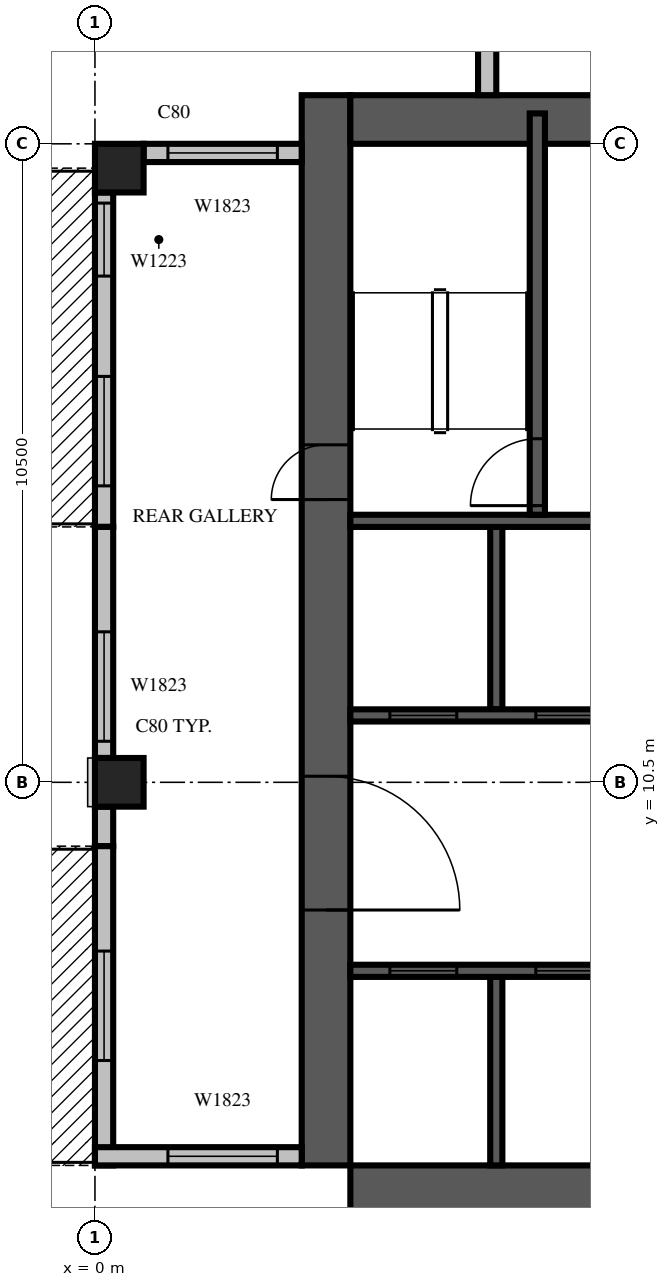
"""IFC4 building model, lengths in metres.
Left out: names, types, materials, properties, quantities, classifications, styles, units other than length and angle.
Written with IfcOpenShell. Run it as: python <this file> out.ifc"""

import sys

from ifc_helpers import new_model, si_unit, direction, frame, frame_2d, origin, origin_2d, place, context, subcontext, project, spatial, rectangle, extrude, source, transform, mapped, element, fill, save


model = new_model("IFC4")
c1 = context("Model", 3, precision=1e-05, world=origin(), true_north=direction((0.0, 1.0)))
c2 = subcontext(c1, "Body", "Model", "MODEL_VIEW")
j1 = project(units=[si_unit("LENGTHUNIT", "METRE"), si_unit("PLANEANGLEUNIT", "RADIAN")], contexts=[c1])
p1 = place(None, origin())
s1 = spatial("IfcSite", under=j1, at=p1, CompositionType="ELEMENT")
p2 = place(p1, origin())
s2 = spatial("IfcBuilding", under=s1, at=p2, CompositionType="ELEMENT")
p3 = place(p2, frame((0.0, 0.0, 253.8)))
s3 = spatial("IfcBuildingStorey", under=s2, at=p3, CompositionType="ELEMENT", Elevation=253.8)
m1 = source(origin(), c2, "Body", "SweptSolid", [
    extrude(rectangle(XDim=0.8, YDim=0.8, at=origin_2d()), origin(), (0.0, 0.0, 1.0), 3.8),
])
for number, where, z_axis, x_axis in (
    (1, (0.4, 10.5, 0.0), (0.0, 0.0, 1.0), (1.0, 0.0, 0.0)),
    (2, (0.4, 20.6, 0.0), (0.0, 0.0, 1.0), (1.0, 0.0, 0.0)),
):
    element("IfcColumn", number, at=place(p3, frame(where, z_axis=z_axis, x_axis=x_axis)), inside=s3, PredefinedType="COLUMN", context=c2, shape_type="MappedRepresentation", body=[
        mapped(m1, transform((0.0, 0.0, 0.0), scale=1.0)),
    ])
m2 = source(origin(), c2, "Body", "SweptSolid", [
    extrude(rectangle(XDim=17.6, YDim=0.8, at=frame_2d((8.8, 0.0))), origin(), (0.0, 0.0, 1.0), 3.8),
])
p4 = place(p3, frame((3.8, 4.2, 0.0), z_axis=(0.0, 0.0, 1.0), x_axis=(0.0, 1.0, 0.0)))
e3 = element("IfcWall", 3, at=p4, inside=s3, PredefinedType="SHEAR", context=c2, shape_type="MappedRepresentation", body=[
    mapped(m2, transform((0.0, 0.0, 0.0), scale=1.0)),
])
m3 = source(origin(), c2, "Body", "SweptSolid", [
    extrude(rectangle(XDim=2.2, YDim=2.1, at=frame_2d((1.1, 1.05))), frame((0.0, 0.41, 0.0), z_axis=(0.0, -1.0, 0.0), x_axis=(1.0, 0.0, 0.0)), (0.0, 0.0, 1.0), 0.82),
])
p5 = place(p4, frame((4.2, 0.0, 0.0)))
e4 = element("IfcOpeningElement", 4, at=p5, cuts=e3, PredefinedType="OPENING", context=c2, shape_type="MappedRepresentation", body=[
    mapped(m3, transform((0.0, 0.0, 0.0), scale=1.0)),
])
m4 = source(origin(), c2, "Body", "SweptSolid", [
    extrude(rectangle(XDim=0.9, YDim=2.1, at=frame_2d((0.45, 1.05))), frame((0.0, 0.41, 0.0), z_axis=(0.0, -1.0, 0.0), x_axis=(1.0, 0.0, 0.0)), (0.0, 0.0, 1.0), 0.82),
])
p6 = place(p4, frame((10.95, 0.0, 0.0)))
e5 = element("IfcOpeningElement", 5, at=p6, cuts=e3, PredefinedType="OPENING", context=c2, shape_type="MappedRepresentation", body=[
    mapped(m4, transform((0.0, 0.0, 0.0), scale=1.0)),
])
p7 = place(p3, frame((4.2, 3.8, 0.0), z_axis=(0.0, 0.0, 1.0), x_axis=(1.0, 0.0, 0.0)))
e6 = element("IfcWall", 6, at=p7, inside=s3, PredefinedType="SHEAR", context=c2, shape_type="MappedRepresentation", body=[
    mapped(m2, transform((0.0, 0.0, 0.0), scale=1.0)),
])
p8 = place(p7, frame((11.55, 0.0, 0.0)))
e7 = element("IfcOpeningElement", 7, at=p8, cuts=e6, PredefinedType="OPENING", context=c2, shape_type="MappedRepresentation", body=[
    mapped(m4, transform((0.0, 0.0, 0.0), scale=1.0)),
])
m5 = source(origin(), c2, "Body", "SweptSolid", [
    extrude(rectangle(XDim=16.8, YDim=0.8, at=frame_2d((8.4, 0.0))), origin(), (0.0, 0.0, 1.0), 3.8),
])
p9 = place(p3, frame((4.2, 21.4, 0.0), z_axis=(0.0, 0.0, 1.0), x_axis=(1.0, 0.0, 0.0)))
e8 = element("IfcWall", 8, at=p9, inside=s3, PredefinedType="SHEAR", context=c2, shape_type="MappedRepresentation", body=[
    mapped(m5, transform((0.0, 0.0, 0.0), scale=1.0)),
])
m6 = source(origin(), c2, "Body", "SweptSolid", [
    extrude(rectangle(XDim=1.2, YDim=2.1, at=frame_2d((0.6, 1.05))), frame((0.0, 0.41, 0.0), z_axis=(0.0, -1.0, 0.0), x_axis=(1.0, 0.0, 0.0)), (0.0, 0.0, 1.0), 0.82),
])
p10 = place(p9, frame((6.2, 0.0, 0.0)))
e9 = element("IfcOpeningElement", 9, at=p10, cuts=e8, PredefinedType="OPENING", context=c2, shape_type="MappedRepresentation", body=[
    mapped(m6, transform((0.0, 0.0, 0.0), scale=1.0)),
])
m7 = source(origin(), c2, "Body", "SweptSolid", [
    extrude(rectangle(XDim=16.6, YDim=0.3, at=frame_2d((8.3, 0.0))), origin(), (0.0, 0.0, 1.0), 3.4),
])
p11 = place(p3, frame((6.45, 38.4, 0.0), z_axis=(0.0, 0.0, 1.0), x_axis=(0.0, -1.0, 0.0)))
e10 = element("IfcWall", 10, at=p11, inside=s3, PredefinedType="STANDARD", context=c2, shape_type="MappedRepresentation", body=[
    mapped(m7, transform((0.0, 0.0, 0.0), scale=1.0)),
])
m8 = source(origin(), c2, "Body", "SweptSolid", [
    extrude(rectangle(XDim=1.8, YDim=2.3, at=frame_2d((0.9, 1.15))), frame((0.0, 0.16, 0.0), z_axis=(0.0, -1.0, 0.0), x_axis=(1.0, 0.0, 0.0)), (0.0, 0.0, 1.0), 0.32),
])
p12 = place(p11, frame((1.15, 0.0, 0.6)))
e11 = element("IfcOpeningElement", 11, at=p12, cuts=e10, PredefinedType="OPENING", context=c2, shape_type="MappedRepresentation", body=[
    mapped(m8, transform((0.0, 0.0, 0.0), scale=1.0)),
])
p13 = place(p11, frame((9.438, 0.0, 0.6)))
e12 = element("IfcOpeningElement", 12, at=p13, cuts=e10, PredefinedType="OPENING", context=c2, shape_type="MappedRepresentation", body=[
    mapped(m8, transform((0.0, 0.0, 0.0), scale=1.0)),
])
m9 = source(origin(), c2, "Body", "SweptSolid", [
    extrude(rectangle(XDim=3.0, YDim=2.3, at=frame_2d((1.5, 1.15))), frame((0.0, 0.16, 0.0), z_axis=(0.0, -1.0, 0.0), x_axis=(1.0, 0.0, 0.0)), (0.0, 0.0, 1.0), 0.32),
])
p14 = place(p11, frame((12.7, 0.0, 0.6)))
e13 = element("IfcOpeningElement", 13, at=p14, cuts=e10, PredefinedType="OPENING", context=c2, shape_type="MappedRepresentation", body=[
    mapped(m9, transform((0.0, 0.0, 0.0), scale=1.0)),
])
m10 = source(origin(), c2, "Body", "SweptSolid", [
    extrude(rectangle(XDim=1.0, YDim=2.1, at=frame_2d((0.5, 1.05))), frame((0.0, 0.16, 0.0), z_axis=(0.0, -1.0, 0.0), x_axis=(1.0, 0.0, 0.0)), (0.0, 0.0, 1.0), 0.32),
])
p15 = place(p11, frame((5.45, 0.0, 0.0)))
e14 = element("IfcOpeningElement", 14, at=p15, cuts=e10, PredefinedType="OPENING", context=c2, shape_type="MappedRepresentation", body=[
    mapped(m10, transform((0.0, 0.0, 0.0), scale=1.0)),
])
m11 = source(origin(), c2, "Body", "SweptSolid", [
    extrude(rectangle(XDim=2.6, YDim=0.3, at=frame_2d((1.3, 0.0))), origin(), (0.0, 0.0, 1.0), 3.4),
])
p16 = place(p3, frame((3.4, 20.85, 0.0), z_axis=(0.0, 0.0, 1.0), x_axis=(-1.0, 0.0, 0.0)))
e15 = element("IfcWall", 15, at=p16, inside=s3, PredefinedType="STANDARD", context=c2, shape_type="MappedRepresentation", body=[
    mapped(m11, transform((0.0, 0.0, 0.0), scale=1.0)),
])
p17 = place(p16, frame((0.4, 0.0, 0.6)))
e16 = element("IfcOpeningElement", 16, at=p17, cuts=e15, PredefinedType="OPENING", context=c2, shape_type="MappedRepresentation", body=[
    mapped(m8, transform((0.0, 0.0, 0.0), scale=1.0)),
])
p18 = place(p3, frame((0.15, 20.2, 0.0), z_axis=(0.0, 0.0, 1.0), x_axis=(0.0, -1.0, 0.0)))
e17 = element("IfcWall", 17, at=p18, inside=s3, PredefinedType="STANDARD", context=c2, shape_type="SweptSolid", body=[
    extrude(rectangle(XDim=5.5, YDim=0.3, at=frame_2d((2.75, 0.0))), origin(), (0.0, 0.0, 1.0), 3.4),
])
m12 = source(origin(), c2, "Body", "SweptSolid", [
    extrude(rectangle(XDim=1.8, YDim=2.4, at=frame_2d((0.9, 1.2))), frame((0.0, 0.16, 0.0), z_axis=(0.0, -1.0, 0.0), x_axis=(1.0, 0.0, 0.0)), (0.0, 0.0, 1.0), 0.32),
])
p19 = place(p18, frame((3.025, 0.0, 0.0)))
e18 = element("IfcOpeningElement", 18, at=p19, cuts=e17, PredefinedType="OPENING", context=c2, shape_type="MappedRepresentation", body=[
    mapped(m12, transform((0.0, 0.0, 0.0), scale=1.0)),
])
m13 = source(origin(), c2, "Body", "SweptSolid", [
    extrude(rectangle(XDim=1.2, YDim=2.3, at=frame_2d((0.6, 1.15))), frame((0.0, 0.16, 0.0), z_axis=(0.0, -1.0, 0.0), x_axis=(1.0, 0.0, 0.0)), (0.0, 0.0, 1.0), 0.32),
])
p20 = place(p18, frame((0.175, 0.0, 0.6)))
e19 = element("IfcOpeningElement", 19, at=p20, cuts=e17, PredefinedType="OPENING", context=c2, shape_type="MappedRepresentation", body=[
    mapped(m13, transform((0.0, 0.0, 0.0), scale=1.0)),
])
m14 = source(origin(), c2, "Body", "SweptSolid", [
    extrude(rectangle(XDim=3.8, YDim=0.3, at=frame_2d((1.9, 0.0))), origin(), (0.0, 0.0, 1.0), 3.4),
])
p21 = place(p3, frame((0.15, 14.7, 0.0), z_axis=(0.0, 0.0, 1.0), x_axis=(0.0, -1.0, 0.0)))
e20 = element("IfcWall", 20, at=p21, inside=s3, PredefinedType="STANDARD", context=c2, shape_type="MappedRepresentation", body=[
    mapped(m14, transform((0.0, 0.0, 0.0), scale=1.0)),
])
p22 = place(p21, frame((1.725, 0.0, 0.6)))
e21 = element("IfcOpeningElement", 21, at=p22, cuts=e20, PredefinedType="OPENING", context=c2, shape_type="MappedRepresentation", body=[
    mapped(m8, transform((0.0, 0.0, 0.0), scale=1.0)),
])
m15 = source(origin(), c2, "Body", "SweptSolid", [
    extrude(rectangle(XDim=0.65, YDim=0.3, at=frame_2d((0.325, 0.0))), origin(), (0.0, 0.0, 1.0), 3.4),
])
p23 = place(p3, frame((0.15, 10.1, 0.0), z_axis=(0.0, 0.0, 1.0), x_axis=(0.0, -1.0, 0.0)))
e22 = element("IfcWall", 22, at=p23, inside=s3, PredefinedType="STANDARD", context=c2, shape_type="MappedRepresentation", body=[
    mapped(m15, transform((0.0, 0.0, 0.0), scale=1.0)),
])
m16 = source(origin(), c2, "Body", "SweptSolid", [
    extrude(rectangle(XDim=5.25, YDim=0.3, at=frame_2d((2.625, 0.0))), origin(), (0.0, 0.0, 1.0), 3.4),
])
p24 = place(p3, frame((0.15, 9.45, 0.0), z_axis=(0.0, 0.0, 1.0), x_axis=(0.0, -1.0, 0.0)))
e23 = element("IfcWall", 23, at=p24, inside=s3, PredefinedType="STANDARD", context=c2, shape_type="MappedRepresentation", body=[
    mapped(m16, transform((0.0, 0.0, 0.0), scale=1.0)),
])
p25 = place(p24, frame((1.725, 0.0, 0.0)))
e24 = element("IfcOpeningElement", 24, at=p25, cuts=e23, PredefinedType="OPENING", context=c2, shape_type="MappedRepresentation", body=[
    mapped(m12, transform((0.0, 0.0, 0.0), scale=1.0)),
])
m17 = source(origin(), c2, "Body", "SweptSolid", [
    extrude(rectangle(XDim=3.4, YDim=0.3, at=frame_2d((1.7, 0.0))), origin(), (0.0, 0.0, 1.0), 3.4),
])
p26 = place(p3, frame((0.0, 4.35, 0.0), z_axis=(0.0, 0.0, 1.0), x_axis=(1.0, 0.0, 0.0)))
e25 = element("IfcWall", 25, at=p26, inside=s3, PredefinedType="STANDARD", context=c2, shape_type="MappedRepresentation", body=[
    mapped(m17, transform((0.0, 0.0, 0.0), scale=1.0)),
])
p27 = place(p26, frame((1.2, 0.0, 0.6)))
e26 = element("IfcOpeningElement", 26, at=p27, cuts=e25, PredefinedType="OPENING", context=c2, shape_type="MappedRepresentation", body=[
    mapped(m8, transform((0.0, 0.0, 0.0), scale=1.0)),
])
m18 = source(origin(), c2, "Body", "SweptSolid", [
    extrude(rectangle(XDim=3.1, YDim=0.2, at=frame_2d((1.55, 0.0))), origin(), (0.0, 0.0, 1.0), 3.8),
])
p28 = place(p3, frame((6.6, 4.2, 0.0), z_axis=(0.0, 0.0, 1.0), x_axis=(0.0, 1.0, 0.0)))
e27 = element("IfcWall", 27, at=p28, inside=s3, PredefinedType="SOLIDWALL", context=c2, shape_type="MappedRepresentation", body=[
    mapped(m18, transform((0.0, 0.0, 0.0), scale=1.0)),
])
m19 = source(origin(), c2, "Body", "SweptSolid", [
    extrude(rectangle(XDim=3.0, YDim=0.2, at=frame_2d((1.5, 0.0))), origin(), (0.0, 0.0, 1.0), 3.8),
])
p29 = place(p3, frame((6.6, 11.7, 0.0), z_axis=(0.0, 0.0, 1.0), x_axis=(0.0, 1.0, 0.0)))
e28 = element("IfcWall", 28, at=p29, inside=s3, PredefinedType="SOLIDWALL", context=c2, shape_type="MappedRepresentation", body=[
    mapped(m19, transform((0.0, 0.0, 0.0), scale=1.0)),
])
m20 = source(origin(), c2, "Body", "SweptSolid", [
    extrude(rectangle(XDim=9.6, YDim=0.2, at=frame_2d((4.8, 0.0))), origin(), (0.0, 0.0, 1.0), 3.8),
])
p30 = place(p3, frame((4.2, 7.4, 0.0), z_axis=(0.0, 0.0, 1.0), x_axis=(1.0, 0.0, 0.0)))
e29 = element("IfcWall", 29, at=p30, inside=s3, PredefinedType="SOLIDWALL", context=c2, shape_type="MappedRepresentation", body=[
    mapped(m20, transform((0.0, 0.0, 0.0), scale=1.0)),
])
m21 = source(origin(), c2, "Body", "SweptSolid", [
    extrude(rectangle(XDim=1.1, YDim=2.1, at=frame_2d((0.55, 1.05))), frame((0.0, 0.11, 0.0), z_axis=(0.0, -1.0, 0.0), x_axis=(1.0, 0.0, 0.0)), (0.0, 0.0, 1.0), 0.22),
])
p31 = place(p30, frame((0.65, 0.0, 0.0)))
e30 = element("IfcOpeningElement", 30, at=p31, cuts=e29, PredefinedType="OPENING", context=c2, shape_type="MappedRepresentation", body=[
    mapped(m21, transform((0.0, 0.0, 0.0), scale=1.0)),
])
p32 = place(p30, frame((3.05, 0.0, 0.0)))
e31 = element("IfcOpeningElement", 31, at=p32, cuts=e29, PredefinedType="OPENING", context=c2, shape_type="MappedRepresentation", body=[
    mapped(m21, transform((0.0, 0.0, 0.0), scale=1.0)),
])
p33 = place(p30, frame((5.45, 0.0, 0.0)))
e32 = element("IfcOpeningElement", 32, at=p33, cuts=e29, PredefinedType="OPENING", context=c2, shape_type="MappedRepresentation", body=[
    mapped(m21, transform((0.0, 0.0, 0.0), scale=1.0)),
])
p34 = place(p30, frame((7.85, 0.0, 0.0)))
e33 = element("IfcOpeningElement", 33, at=p34, cuts=e29, PredefinedType="OPENING", context=c2, shape_type="MappedRepresentation", body=[
    mapped(m21, transform((0.0, 0.0, 0.0), scale=1.0)),
])
m22 = source(origin(), c2, "Body", "SweptSolid", [
    extrude(rectangle(XDim=4.8, YDim=0.2, at=frame_2d((2.4, 0.0))), origin(), (0.0, 0.0, 1.0), 3.8),
])
p35 = place(p3, frame((4.2, 11.6, 0.0), z_axis=(0.0, 0.0, 1.0), x_axis=(1.0, 0.0, 0.0)))
e34 = element("IfcWall", 34, at=p35, inside=s3, PredefinedType="SOLIDWALL", context=c2, shape_type="MappedRepresentation", body=[
    mapped(m22, transform((0.0, 0.0, 0.0), scale=1.0)),
])
p36 = place(p35, frame((0.65, 0.0, 0.0)))
e35 = element("IfcOpeningElement", 35, at=p36, cuts=e34, PredefinedType="OPENING", context=c2, shape_type="MappedRepresentation", body=[
    mapped(m21, transform((0.0, 0.0, 0.0), scale=1.0)),
])
p37 = place(p35, frame((3.05, 0.0, 0.0)))
e36 = element("IfcOpeningElement", 36, at=p37, cuts=e34, PredefinedType="OPENING", context=c2, shape_type="MappedRepresentation", body=[
    mapped(m21, transform((0.0, 0.0, 0.0), scale=1.0)),
])
p38 = place(p3, frame((4.2, 14.8, 0.0), z_axis=(0.0, 0.0, 1.0), x_axis=(1.0, 0.0, 0.0)))
e37 = element("IfcWall", 37, at=p38, inside=s3, PredefinedType="SOLIDWALL", context=c2, shape_type="MappedRepresentation", body=[
    mapped(m22, transform((0.0, 0.0, 0.0), scale=1.0)),
])
m23 = source(origin(), c2, "Body", "SweptSolid", [
    extrude(rectangle(XDim=6.6, YDim=0.25, at=frame_2d((3.3, 0.0))), origin(), (0.0, 0.0, 1.0), 3.4),
])
p39 = place(p3, frame((7.275, 14.9, 0.0), z_axis=(0.0, 0.0, 1.0), x_axis=(0.0, 1.0, 0.0)))
e38 = element("IfcWall", 38, at=p39, inside=s3, PredefinedType="SOLIDWALL", context=c2, shape_type="MappedRepresentation", body=[
    mapped(m23, transform((0.0, 0.0, 0.0), scale=1.0)),
])
m24 = source(origin(), c2, "Body", "SweptSolid", [
    extrude(rectangle(XDim=1.1, YDim=2.1, at=frame_2d((0.55, 1.05))), frame((0.0, 0.135, 0.0), z_axis=(0.0, -1.0, 0.0), x_axis=(1.0, 0.0, 0.0)), (0.0, 0.0, 1.0), 0.27),
])
p40 = place(p39, frame((0.15, 0.0, 0.0)))
e39 = element("IfcOpeningElement", 39, at=p40, cuts=e38, PredefinedType="OPENING", context=c2, shape_type="MappedRepresentation", body=[
    mapped(m24, transform((0.0, 0.0, 0.0), scale=1.0)),
])
m25 = source(origin(), c2, "Body", "SweptSolid", [
    extrude(rectangle(XDim=1.8, YDim=2.3, at=frame_2d((0.9, 1.15))), frame((0.0, 0.03, 0.0), z_axis=(0.0, -1.0, 0.0), x_axis=(1.0, 0.0, 0.0)), (0.0, 0.0, 1.0), 0.06),
])
p41 = place(p17, origin())
e40 = element("IfcWindow", 40, at=p41, inside=s3, PartitioningType="SINGLE_PANEL", PredefinedType="WINDOW", context=c2, shape_type="MappedRepresentation", body=[
    mapped(m25, transform((0.0, 0.0, 0.0), scale=1.0)),
])
fill(e16, e40)
m26 = source(origin(), c2, "Body", "SweptSolid", [
    extrude(rectangle(XDim=1.8, YDim=2.4, at=frame_2d((0.9, 1.2))), frame((0.0, 0.025, 0.0), z_axis=(0.0, -1.0, 0.0), x_axis=(1.0, 0.0, 0.0)), (0.0, 0.0, 1.0), 0.05),
])
p42 = place(p19, origin())
e41 = element("IfcDoor", 41, at=p42, inside=s3, OperationType="SLIDING_TO_LEFT", PredefinedType="DOOR", context=c2, shape_type="MappedRepresentation", body=[
    mapped(m26, transform((0.0, 0.0, 0.0), scale=1.0)),
])
fill(e18, e41)
m27 = source(origin(), c2, "Body", "SweptSolid", [
    extrude(rectangle(XDim=1.2, YDim=2.3, at=frame_2d((0.6, 1.15))), frame((0.0, 0.03, 0.0), z_axis=(0.0, -1.0, 0.0), x_axis=(1.0, 0.0, 0.0)), (0.0, 0.0, 1.0), 0.06),
])
p43 = place(p20, origin())
e42 = element("IfcWindow", 42, at=p43, inside=s3, PartitioningType="SINGLE_PANEL", PredefinedType="WINDOW", context=c2, shape_type="MappedRepresentation", body=[
    mapped(m27, transform((0.0, 0.0, 0.0), scale=1.0)),
])
fill(e19, e42)
p44 = place(p22, origin())
e43 = element("IfcWindow", 43, at=p44, inside=s3, PartitioningType="SINGLE_PANEL", PredefinedType="WINDOW", context=c2, shape_type="MappedRepresentation", body=[
    mapped(m25, transform((0.0, 0.0, 0.0), scale=1.0)),
])
fill(e21, e43)
p45 = place(p25, origin())
e44 = element("IfcDoor", 44, at=p45, inside=s3, OperationType="SLIDING_TO_LEFT", PredefinedType="DOOR", context=c2, shape_type="MappedRepresentation", body=[
    mapped(m26, transform((0.0, 0.0, 0.0), scale=1.0)),
])
fill(e24, e44)
p46 = place(p27, origin())
e45 = element("IfcWindow", 45, at=p46, inside=s3, PartitioningType="SINGLE_PANEL", PredefinedType="WINDOW", context=c2, shape_type="MappedRepresentation", body=[
    mapped(m25, transform((0.0, 0.0, 0.0), scale=1.0)),
])
fill(e26, e45)
m28 = source(origin(), c2, "Body", "SweptSolid", [
    extrude(rectangle(XDim=1.1, YDim=2.1, at=frame_2d((0.55, 1.05))), frame((0.0, 0.025, 0.0), z_axis=(0.0, -1.0, 0.0), x_axis=(1.0, 0.0, 0.0)), (0.0, 0.0, 1.0), 0.05),
])
p47 = place(p31, origin())
e46 = element("IfcDoor", 46, at=p47, inside=s3, OperationType="SLIDING_TO_LEFT", PredefinedType="DOOR", context=c2, shape_type="MappedRepresentation", body=[
    mapped(m28, transform((0.0, 0.0, 0.0), scale=1.0)),
])
fill(e30, e46)
p48 = place(p32, origin())
e47 = element("IfcDoor", 47, at=p48, inside=s3, OperationType="SLIDING_TO_LEFT", PredefinedType="DOOR", context=c2, shape_type="MappedRepresentation", body=[
    mapped(m28, transform((0.0, 0.0, 0.0), scale=1.0)),
])
fill(e31, e47)
p49 = place(p36, origin())
e48 = element("IfcDoor", 48, at=p49, inside=s3, OperationType="SLIDING_TO_LEFT", PredefinedType="DOOR", context=c2, shape_type="MappedRepresentation", body=[
    mapped(m28, transform((0.0, 0.0, 0.0), scale=1.0)),
])
fill(e35, e48)
p50 = place(p37, origin())
e49 = element("IfcDoor", 49, at=p50, inside=s3, OperationType="SLIDING_TO_LEFT", PredefinedType="DOOR", context=c2, shape_type="MappedRepresentation", body=[
    mapped(m28, transform((0.0, 0.0, 0.0), scale=1.0)),
])
fill(e36, e49)
p51 = place(p40, origin())
e50 = element("IfcDoor", 50, at=p51, inside=s3, OperationType="SINGLE_SWING_LEFT", PredefinedType="DOOR", context=c2, shape_type="MappedRepresentation", body=[
    mapped(m28, transform((0.0, 0.0, 0.0), scale=1.0)),
])
fill(e39, e50)
m29 = source(origin(), c2, "Body", "SweptSolid", [
    extrude(rectangle(XDim=2.2, YDim=2.1, at=frame_2d((1.1, 1.05))), frame((0.0, 0.025, 0.0), z_axis=(0.0, -1.0, 0.0), x_axis=(1.0, 0.0, 0.0)), (0.0, 0.0, 1.0), 0.05),
])
p52 = place(p5, origin())
e51 = element("IfcDoor", 51, at=p52, inside=s3, OperationType="DOUBLE_DOOR_SINGLE_SWING", PredefinedType="DOOR", context=c2, shape_type="MappedRepresentation", body=[
    mapped(m29, transform((0.0, 0.0, 0.0), scale=1.0)),
])
fill(e4, e51)
m30 = source(origin(), c2, "Body", "SweptSolid", [
    extrude(rectangle(XDim=0.9, YDim=2.1, at=frame_2d((0.45, 1.05))), frame((0.0, 0.025, 0.0), z_axis=(0.0, -1.0, 0.0), x_axis=(1.0, 0.0, 0.0)), (0.0, 0.0, 1.0), 0.05),
])
p53 = place(p6, origin())
e52 = element("IfcDoor", 52, at=p53, inside=s3, OperationType="SINGLE_SWING_LEFT", PredefinedType="DOOR", context=c2, shape_type="MappedRepresentation", body=[
    mapped(m30, transform((0.0, 0.0, 0.0), scale=1.0)),
])
fill(e5, e52)
save(model, sys.argv[1])
